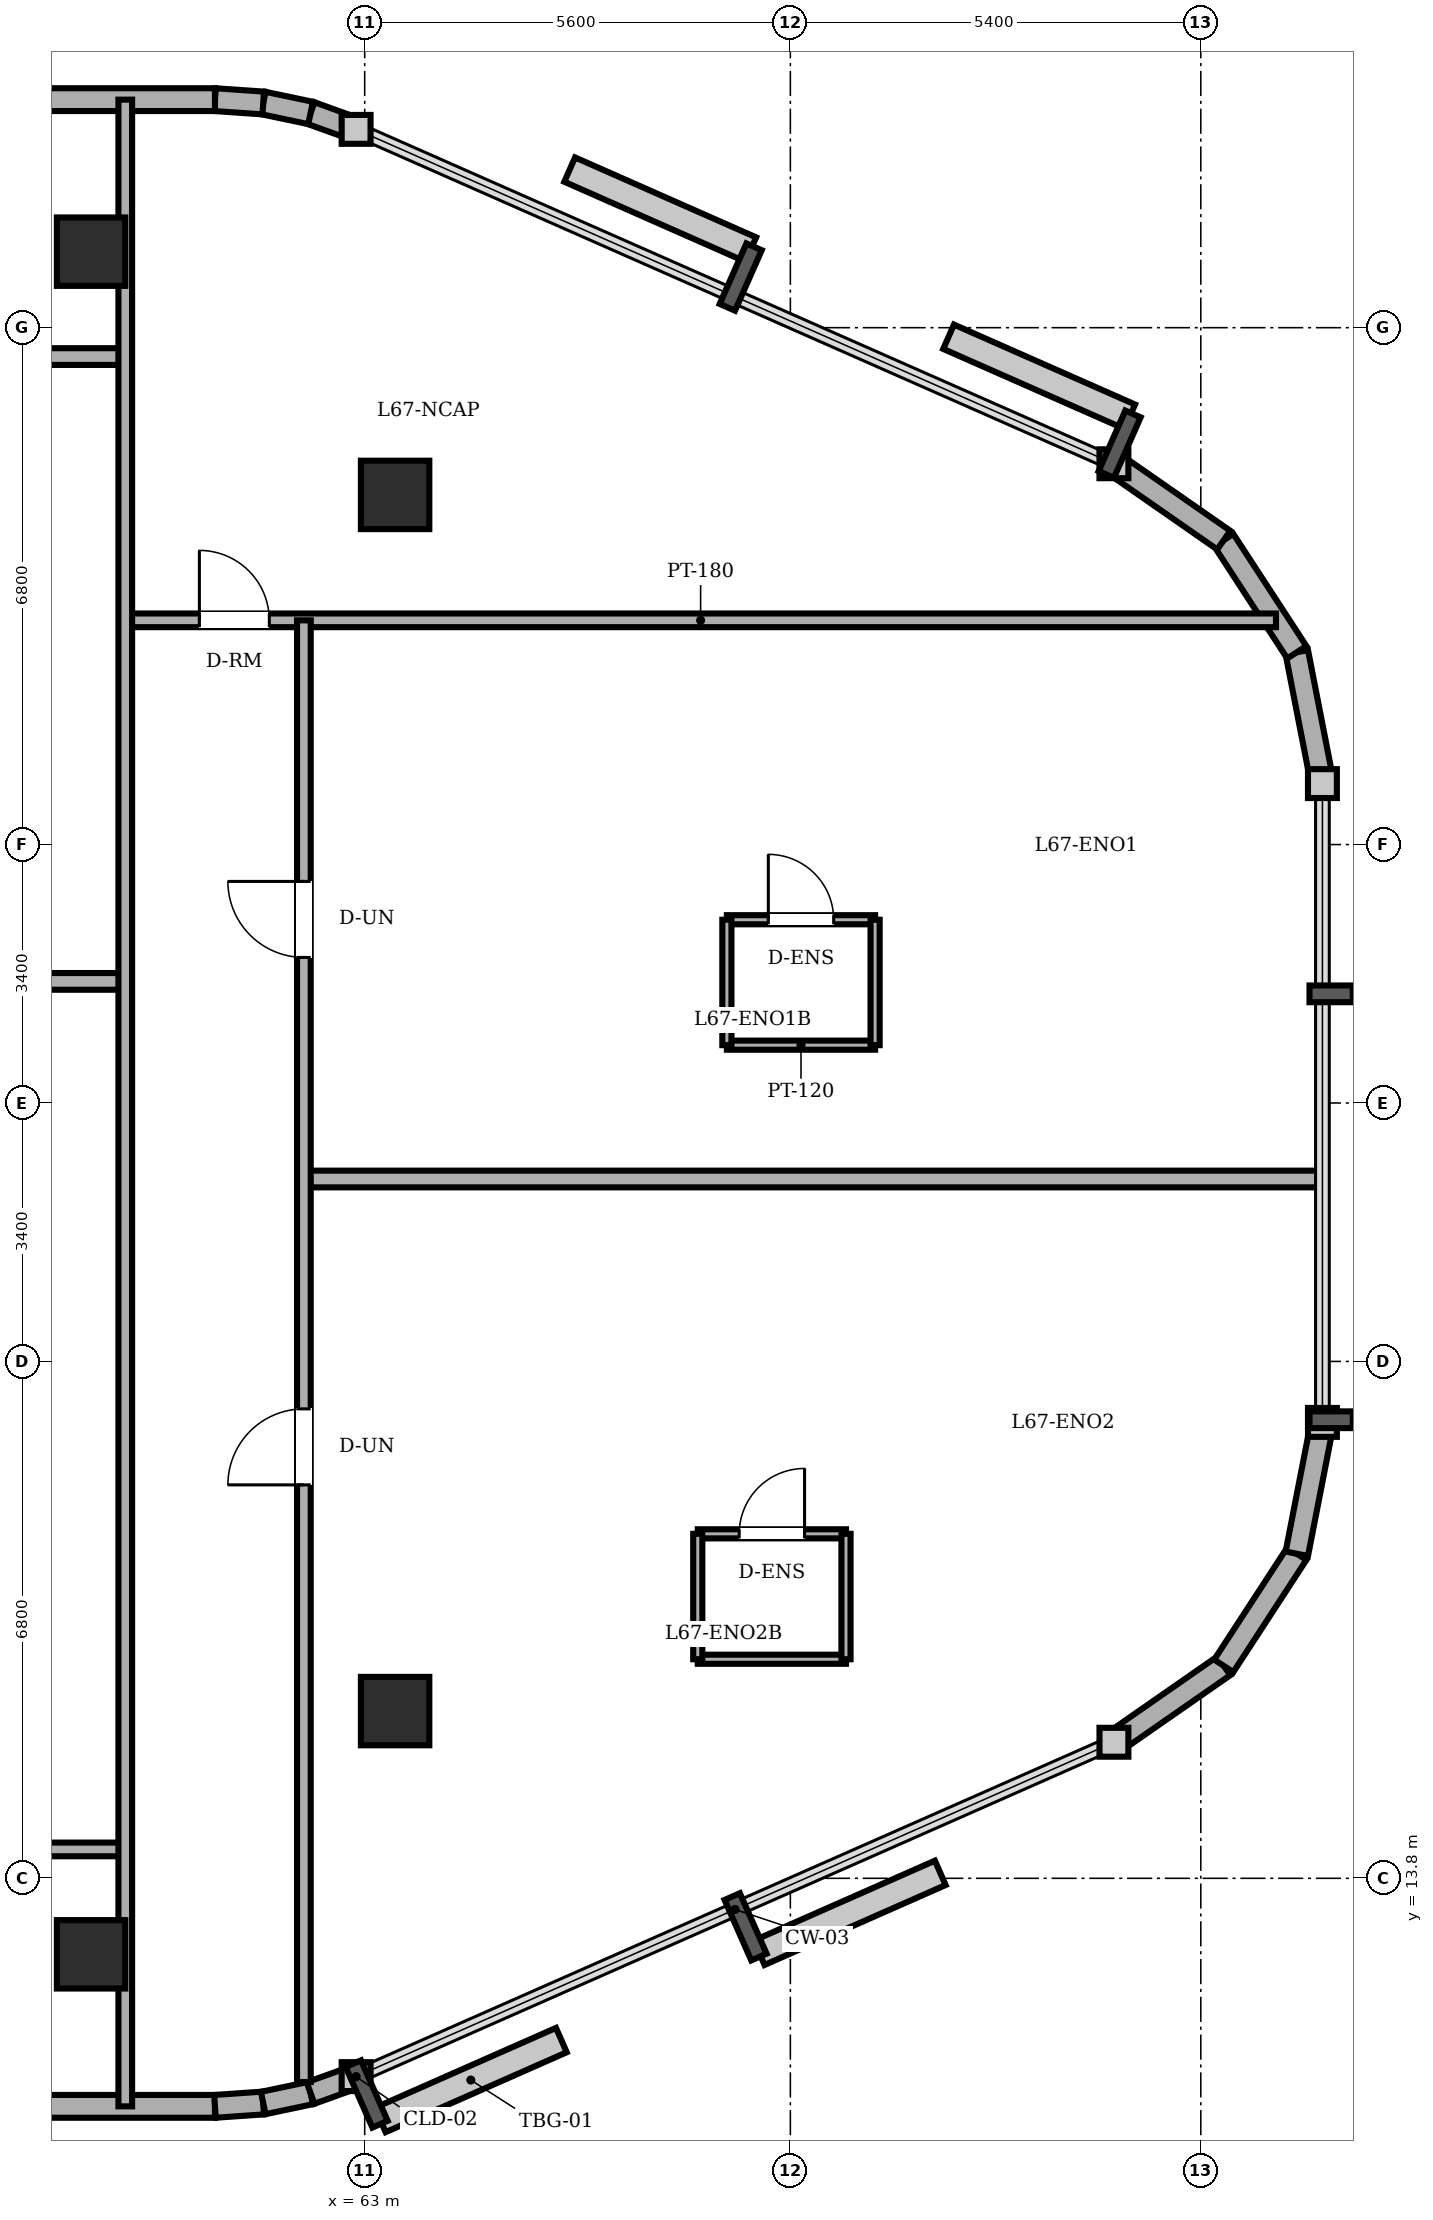
"""IFC4 building model, lengths in metres.
Left out: names, types, materials, properties, quantities, classifications, styles, units other than length and angle.
Written with IfcOpenShell. Run it as: python <this file> out.ifc"""

import sys

from ifc_helpers import new_model, si_unit, direction, frame, frame_2d, origin, origin_2d, place, context, subcontext, project, spatial, rectangle, circle, extrude, element, fill, save


model = new_model("IFC4")
c1 = context("Model", 3, precision=1e-05, world=origin(), true_north=direction((0.0, 1.0)))
c2 = subcontext(c1, "Body", "Model", "MODEL_VIEW")
j1 = project(units=[si_unit("LENGTHUNIT", "METRE"), si_unit("PLANEANGLEUNIT", "RADIAN")], contexts=[c1])
p1 = place(None, origin())
s1 = spatial("IfcSite", under=j1, at=p1, CompositionType="ELEMENT")
p2 = place(p1, origin())
s2 = spatial("IfcBuilding", under=s1, at=p2, CompositionType="ELEMENT")
p3 = place(p2, frame((0.0, 0.0, 258.8)))
s3 = spatial("IfcBuildingStorey", under=s2, at=p3, CompositionType="ELEMENT", Elevation=258.8)
for number, where, z_axis, x_axis in (
    (1, (59.4, 12.8, 0.0), (0.0, 0.0, 1.0), (1.0, 0.0, 0.0)),
    (2, (63.4, 16.0, 0.0), (0.0, 0.0, 1.0), (1.0, 0.0, 0.0)),
    (3, (63.4, 32.0, 0.0), (0.0, 0.0, 1.0), (1.0, 0.0, 0.0)),
    (4, (59.4, 35.2, 0.0), (0.0, 0.0, 1.0), (1.0, 0.0, 0.0)),
):
    element("IfcColumn", number, at=place(p3, frame(where, z_axis=z_axis, x_axis=x_axis)), inside=s3, PredefinedType="COLUMN", context=c2, shape_type="SweptSolid", body=[
        extrude(circle(Radius=0.45, at=origin_2d()), origin(), (0.0, 0.0, 1.0), 3.65),
    ])
p4 = place(p3, frame((24.0, 10.8, 0.0), z_axis=(0.0, 0.0, 1.0), x_axis=(1.0, 0.0, 0.0)))
e5 = element("IfcWall", 5, at=p4, inside=s3, PredefinedType="SOLIDWALL", context=c2, shape_type="SweptSolid", body=[
    extrude(rectangle(XDim=37.03, YDim=0.3, at=frame_2d((18.515, 0.0))), origin(), (0.0, 0.0, 1.0), 3.45),
])
p5 = place(p4, frame((9.725, 0.0, 0.0)))
e6 = element("IfcOpeningElement", 6, at=p5, cuts=e5, PredefinedType="OPENING", context=c2, shape_type="SweptSolid", body=[
    extrude(rectangle(XDim=0.95, YDim=2.2, at=frame_2d((0.475, 1.1))), frame((0.0, 0.16, 0.0), z_axis=(0.0, -1.0, 0.0), x_axis=(1.0, 0.0, 0.0)), (0.0, 0.0, 1.0), 0.32),
])
p6 = place(p4, frame((4.917, 0.0, 0.85)))
e7 = element("IfcOpeningElement", 7, at=p6, cuts=e5, PredefinedType="OPENING", context=c2, shape_type="SweptSolid", body=[
    extrude(rectangle(XDim=1.2, YDim=1.6, at=frame_2d((0.6, 0.8))), frame((0.0, 0.16, 0.0), z_axis=(0.0, -1.0, 0.0), x_axis=(1.0, 0.0, 0.0)), (0.0, 0.0, 1.0), 0.32),
])
p7 = place(p4, frame((21.917, 0.0, 0.85)))
e8 = element("IfcOpeningElement", 8, at=p7, cuts=e5, PredefinedType="OPENING", context=c2, shape_type="SweptSolid", body=[
    extrude(rectangle(XDim=1.2, YDim=1.6, at=frame_2d((0.6, 0.8))), frame((0.0, 0.16, 0.0), z_axis=(0.0, -1.0, 0.0), x_axis=(1.0, 0.0, 0.0)), (0.0, 0.0, 1.0), 0.32),
])
p8 = place(p4, frame((28.583, 0.0, 0.85)))
e9 = element("IfcOpeningElement", 9, at=p8, cuts=e5, PredefinedType="OPENING", context=c2, shape_type="SweptSolid", body=[
    extrude(rectangle(XDim=1.2, YDim=1.6, at=frame_2d((0.6, 0.8))), frame((0.0, 0.16, 0.0), z_axis=(0.0, -1.0, 0.0), x_axis=(1.0, 0.0, 0.0)), (0.0, 0.0, 1.0), 0.32),
])
p9 = place(p3, frame((61.03, 10.8, 0.0), z_axis=(0.0, 0.0, 1.0), x_axis=(0.997613959688, 0.069039028352, 0.0)))
e10 = element("IfcWall", 10, at=p9, inside=s3, PredefinedType="SOLIDWALL", context=c2, shape_type="SweptSolid", body=[
    extrude(rectangle(XDim=0.636, YDim=0.3, at=frame_2d((0.318, 0.0))), origin(), (0.0, 0.0, 1.0), 3.45),
])
p10 = place(p3, frame((61.665, 10.844, 0.0), z_axis=(0.0, 0.0, 1.0), x_axis=(0.97857012251, 0.205913854149, 0.0)))
e11 = element("IfcWall", 11, at=p10, inside=s3, PredefinedType="SOLIDWALL", context=c2, shape_type="SweptSolid", body=[
    extrude(rectangle(XDim=0.637, YDim=0.3, at=frame_2d((0.318, 0.0))), origin(), (0.0, 0.0, 1.0), 3.45),
])
p11 = place(p3, frame((62.288, 10.975, 0.0), z_axis=(0.0, 0.0, 1.0), x_axis=(0.94077491148, 0.339031806665, 0.0)))
e12 = element("IfcWall", 12, at=p11, inside=s3, PredefinedType="SOLIDWALL", context=c2, shape_type="SweptSolid", body=[
    extrude(rectangle(XDim=0.636, YDim=0.3, at=frame_2d((0.318, 0.0))), origin(), (0.0, 0.0, 1.0), 3.45),
])
p12 = place(p3, frame((72.857, 15.59, 0.0), z_axis=(0.0, 0.0, 1.0), x_axis=(0.821006966142, 0.570918174124, 0.0)))
e13 = element("IfcWall", 13, at=p12, inside=s3, PredefinedType="SOLIDWALL", context=c2, shape_type="SweptSolid", body=[
    extrude(rectangle(XDim=1.76, YDim=0.3, at=frame_2d((0.88, 0.0))), origin(), (0.0, 0.0, 1.0), 3.45),
])
for number, where, z_axis, x_axis in (
    (14, (74.302, 16.595, 0.0), (0.0, 0.0, 1.0), (0.546, 0.838, 0.0)),
    (15, (75.263, 18.07, 0.0), (0.0, 0.0, 1.0), (0.192, 0.981, 0.0)),
    (16, (75.6, 28.202, 0.0), (0.0, 0.0, 1.0), (-0.192, 0.981, 0.0)),
    (17, (75.263, 29.93, 0.0), (0.0, 0.0, 1.0), (-0.546, 0.838, 0.0)),
):
    element("IfcWall", number, at=place(p3, frame(where, z_axis=z_axis, x_axis=x_axis)), inside=s3, PredefinedType="SOLIDWALL", context=c2, shape_type="SweptSolid", body=[
        extrude(rectangle(XDim=1.76, YDim=0.3, at=frame_2d((0.88, 0.0))), origin(), (0.0, 0.0, 1.0), 3.45),
    ])
p13 = place(p3, frame((74.302, 31.405, 0.0), z_axis=(0.0, 0.0, 1.0), x_axis=(-0.821006966142, 0.570918174124, 0.0)))
e18 = element("IfcWall", 18, at=p13, inside=s3, PredefinedType="SOLIDWALL", context=c2, shape_type="SweptSolid", body=[
    extrude(rectangle(XDim=1.76, YDim=0.3, at=frame_2d((0.88, 0.0))), origin(), (0.0, 0.0, 1.0), 3.45),
])
p14 = place(p3, frame((62.887, 36.809, 0.0), z_axis=(0.0, 0.0, 1.0), x_axis=(-0.94077491148, 0.339031806665, 0.0)))
e19 = element("IfcWall", 19, at=p14, inside=s3, PredefinedType="SOLIDWALL", context=c2, shape_type="SweptSolid", body=[
    extrude(rectangle(XDim=0.636, YDim=0.3, at=frame_2d((0.318, 0.0))), origin(), (0.0, 0.0, 1.0), 3.45),
])
p15 = place(p3, frame((62.288, 37.025, 0.0), z_axis=(0.0, 0.0, 1.0), x_axis=(-0.97857012251, 0.205913854149, 0.0)))
e20 = element("IfcWall", 20, at=p15, inside=s3, PredefinedType="SOLIDWALL", context=c2, shape_type="SweptSolid", body=[
    extrude(rectangle(XDim=0.637, YDim=0.3, at=frame_2d((0.318, 0.0))), origin(), (0.0, 0.0, 1.0), 3.45),
])
p16 = place(p3, frame((61.665, 37.156, 0.0), z_axis=(0.0, 0.0, 1.0), x_axis=(-0.997613959688, 0.069039028352, 0.0)))
e21 = element("IfcWall", 21, at=p16, inside=s3, PredefinedType="SOLIDWALL", context=c2, shape_type="SweptSolid", body=[
    extrude(rectangle(XDim=0.636, YDim=0.3, at=frame_2d((0.318, 0.0))), origin(), (0.0, 0.0, 1.0), 3.45),
])
p17 = place(p3, frame((61.03, 37.2, 0.0), z_axis=(0.0, 0.0, 1.0), x_axis=(-1.0, 0.0, 0.0)))
e22 = element("IfcWall", 22, at=p17, inside=s3, PredefinedType="SOLIDWALL", context=c2, shape_type="SweptSolid", body=[
    extrude(rectangle(XDim=37.03, YDim=0.3, at=frame_2d((18.515, 0.0))), origin(), (0.0, 0.0, 1.0), 3.45),
])
p18 = place(p17, frame((30.855, 0.0, 0.0)))
e23 = element("IfcOpeningElement", 23, at=p18, cuts=e22, PredefinedType="OPENING", context=c2, shape_type="SweptSolid", body=[
    extrude(rectangle(XDim=0.95, YDim=2.2, at=frame_2d((0.475, 1.1))), frame((0.0, 0.16, 0.0), z_axis=(0.0, -1.0, 0.0), x_axis=(1.0, 0.0, 0.0)), (0.0, 0.0, 1.0), 0.32),
])
p19 = place(p17, frame((7.247, 0.0, 0.85)))
e24 = element("IfcOpeningElement", 24, at=p19, cuts=e22, PredefinedType="OPENING", context=c2, shape_type="SweptSolid", body=[
    extrude(rectangle(XDim=1.2, YDim=1.6, at=frame_2d((0.6, 0.8))), frame((0.0, 0.16, 0.0), z_axis=(0.0, -1.0, 0.0), x_axis=(1.0, 0.0, 0.0)), (0.0, 0.0, 1.0), 0.32),
])
p20 = place(p17, frame((13.913, 0.0, 0.85)))
e25 = element("IfcOpeningElement", 25, at=p20, cuts=e22, PredefinedType="OPENING", context=c2, shape_type="SweptSolid", body=[
    extrude(rectangle(XDim=1.2, YDim=1.6, at=frame_2d((0.6, 0.8))), frame((0.0, 0.16, 0.0), z_axis=(0.0, -1.0, 0.0), x_axis=(1.0, 0.0, 0.0)), (0.0, 0.0, 1.0), 0.32),
])
p21 = place(p17, frame((25.747, 0.0, 0.85)))
e26 = element("IfcOpeningElement", 26, at=p21, cuts=e22, PredefinedType="OPENING", context=c2, shape_type="SweptSolid", body=[
    extrude(rectangle(XDim=1.2, YDim=1.6, at=frame_2d((0.6, 0.8))), frame((0.0, 0.16, 0.0), z_axis=(0.0, -1.0, 0.0), x_axis=(1.0, 0.0, 0.0)), (0.0, 0.0, 1.0), 0.32),
])
p22 = place(p3, frame((67.765, 26.411, 0.0), z_axis=(0.0, 0.0, 1.0), x_axis=(1.0, 0.0, 0.0)))
e27 = element("IfcWall", 27, at=p22, inside=s3, PredefinedType="PARTITIONING", context=c2, shape_type="SweptSolid", body=[
    extrude(rectangle(XDim=1.95, YDim=0.12, at=frame_2d((0.975, 0.0))), origin(), (0.0, 0.0, 1.0), 3.45),
])
p23 = place(p22, frame((0.545, 0.0, 0.0)))
e28 = element("IfcOpeningElement", 28, at=p23, cuts=e27, PredefinedType="OPENING", context=c2, shape_type="SweptSolid", body=[
    extrude(rectangle(XDim=0.86, YDim=2.1, at=frame_2d((0.43, 1.05))), frame((0.0, 0.07, 0.0), z_axis=(0.0, -1.0, 0.0), x_axis=(1.0, 0.0, 0.0)), (0.0, 0.0, 1.0), 0.14),
])
p24 = place(p3, frame((69.715, 24.761, 0.0), z_axis=(0.0, 0.0, 1.0), x_axis=(-1.0, 0.0, 0.0)))
e29 = element("IfcWall", 29, at=p24, inside=s3, PredefinedType="PARTITIONING", context=c2, shape_type="SweptSolid", body=[
    extrude(rectangle(XDim=1.95, YDim=0.12, at=frame_2d((0.975, 0.0))), origin(), (0.0, 0.0, 1.0), 3.45),
])
for number, where, z_axis, x_axis in (
    (30, (67.765, 26.411, 0.0), (0.0, 0.0, 1.0), (0.0, -1.0, 0.0)),
    (31, (69.715, 24.761, 0.0), (0.0, 0.0, 1.0), (0.0, 1.0, 0.0)),
):
    element("IfcWall", number, at=place(p3, frame(where, z_axis=z_axis, x_axis=x_axis)), inside=s3, PredefinedType="PARTITIONING", context=c2, shape_type="SweptSolid", body=[
        extrude(rectangle(XDim=1.65, YDim=0.12, at=frame_2d((0.825, 0.0))), origin(), (0.0, 0.0, 1.0), 3.45),
    ])
p25 = place(p3, frame((67.382, 18.332, 0.0), z_axis=(0.0, 0.0, 1.0), x_axis=(1.0, 0.0, 0.0)))
e32 = element("IfcWall", 32, at=p25, inside=s3, PredefinedType="PARTITIONING", context=c2, shape_type="SweptSolid", body=[
    extrude(rectangle(XDim=1.95, YDim=0.12, at=frame_2d((0.975, 0.0))), origin(), (0.0, 0.0, 1.0), 3.45),
])
p26 = place(p25, frame((0.545, 0.0, 0.0)))
e33 = element("IfcOpeningElement", 33, at=p26, cuts=e32, PredefinedType="OPENING", context=c2, shape_type="SweptSolid", body=[
    extrude(rectangle(XDim=0.86, YDim=2.1, at=frame_2d((0.43, 1.05))), frame((0.0, 0.07, 0.0), z_axis=(0.0, -1.0, 0.0), x_axis=(1.0, 0.0, 0.0)), (0.0, 0.0, 1.0), 0.14),
])
p27 = place(p3, frame((69.332, 16.682, 0.0), z_axis=(0.0, 0.0, 1.0), x_axis=(-1.0, 0.0, 0.0)))
e34 = element("IfcWall", 34, at=p27, inside=s3, PredefinedType="PARTITIONING", context=c2, shape_type="SweptSolid", body=[
    extrude(rectangle(XDim=1.95, YDim=0.12, at=frame_2d((0.975, 0.0))), origin(), (0.0, 0.0, 1.0), 3.45),
])
for number, where, z_axis, x_axis in (
    (35, (67.382, 18.332, 0.0), (0.0, 0.0, 1.0), (0.0, -1.0, 0.0)),
    (36, (69.332, 16.682, 0.0), (0.0, 0.0, 1.0), (0.0, 1.0, 0.0)),
):
    element("IfcWall", number, at=place(p3, frame(where, z_axis=z_axis, x_axis=x_axis)), inside=s3, PredefinedType="PARTITIONING", context=c2, shape_type="SweptSolid", body=[
        extrude(rectangle(XDim=1.65, YDim=0.12, at=frame_2d((0.825, 0.0))), origin(), (0.0, 0.0, 1.0), 3.45),
    ])
p28 = place(p3, frame((39.85, 14.18, 0.0), z_axis=(0.0, 0.0, 1.0), x_axis=(1.0, 0.0, 0.0)))
e37 = element("IfcWall", 37, at=p28, inside=s3, PredefinedType="PARTITIONING", context=c2, shape_type="SweptSolid", body=[
    extrude(rectangle(XDim=20.0, YDim=0.18, at=frame_2d((10.0, 0.0))), origin(), (0.0, 0.0, 1.0), 3.092),
])
p29 = place(p28, frame((9.54, 0.0, 0.0)))
e38 = element("IfcOpeningElement", 38, at=p29, cuts=e37, PredefinedType="OPENING", context=c2, shape_type="SweptSolid", body=[
    extrude(rectangle(XDim=0.92, YDim=2.1, at=frame_2d((0.46, 1.05))), frame((0.0, 0.1, 0.0), z_axis=(0.0, -1.0, 0.0), x_axis=(1.0, 0.0, 0.0)), (0.0, 0.0, 1.0), 0.2),
])
p30 = place(p3, frame((62.2, 23.0, 0.0), z_axis=(0.0, 0.0, 1.0), x_axis=(1.0, 0.0, 0.0)))
e39 = element("IfcWall", 39, at=p30, inside=s3, PredefinedType="PARTITIONING", context=c2, shape_type="SweptSolid", body=[
    extrude(rectangle(XDim=13.4, YDim=0.22, at=frame_2d((6.7, 0.0))), origin(), (0.0, 0.0, 1.0), 3.45),
])
p31 = place(p3, frame((39.85, 25.6, 0.0), z_axis=(0.0, 0.0, 1.0), x_axis=(1.0, 0.0, 0.0)))
e40 = element("IfcWall", 40, at=p31, inside=s3, PredefinedType="PARTITIONING", context=c2, shape_type="SweptSolid", body=[
    extrude(rectangle(XDim=20.0, YDim=0.22, at=frame_2d((10.0, 0.0))), origin(), (0.0, 0.0, 1.0), 3.45),
])
p32 = place(p3, frame((59.85, 30.35, 0.0), z_axis=(0.0, 0.0, 1.0), x_axis=(1.0, 0.0, 0.0)))
e41 = element("IfcWall", 41, at=p32, inside=s3, PredefinedType="PARTITIONING", context=c2, shape_type="SweptSolid", body=[
    extrude(rectangle(XDim=15.139, YDim=0.18, at=frame_2d((7.569, 0.0))), origin(), (0.0, 0.0, 1.0), 3.45),
])
p33 = place(p32, frame((0.975, 0.0, 0.0)))
e42 = element("IfcOpeningElement", 42, at=p33, cuts=e41, PredefinedType="OPENING", context=c2, shape_type="SweptSolid", body=[
    extrude(rectangle(XDim=0.92, YDim=2.1, at=frame_2d((0.46, 1.05))), frame((0.0, 0.1, 0.0), z_axis=(0.0, -1.0, 0.0), x_axis=(1.0, 0.0, 0.0)), (0.0, 0.0, 1.0), 0.2),
])
p34 = place(p3, frame((39.85, 33.82, 0.0), z_axis=(0.0, 0.0, 1.0), x_axis=(1.0, 0.0, 0.0)))
e43 = element("IfcWall", 43, at=p34, inside=s3, PredefinedType="PARTITIONING", context=c2, shape_type="SweptSolid", body=[
    extrude(rectangle(XDim=20.0, YDim=0.22, at=frame_2d((10.0, 0.0))), origin(), (0.0, 0.0, 1.0), 3.092),
])
p35 = place(p3, frame((59.85, 10.8, 0.0), z_axis=(0.0, 0.0, 1.0), x_axis=(0.0, 1.0, 0.0)))
e44 = element("IfcWall", 44, at=p35, inside=s3, PredefinedType="PARTITIONING", context=c2, shape_type="SweptSolid", body=[
    extrude(rectangle(XDim=26.4, YDim=0.18, at=frame_2d((13.2, 0.0))), origin(), (0.0, 0.0, 1.0), 3.45),
])
p36 = place(p3, frame((62.2, 11.12, 0.0), z_axis=(0.0, 0.0, 1.0), x_axis=(0.0, 1.0, 0.0)))
e45 = element("IfcWall", 45, at=p36, inside=s3, PredefinedType="PARTITIONING", context=c2, shape_type="SweptSolid", body=[
    extrude(rectangle(XDim=19.23, YDim=0.18, at=frame_2d((9.615, 0.0))), origin(), (0.0, 0.0, 1.0), 3.45),
])
p37 = place(p36, frame((14.795, 0.0, 0.0)))
e46 = element("IfcOpeningElement", 46, at=p37, cuts=e45, PredefinedType="OPENING", context=c2, shape_type="SweptSolid", body=[
    extrude(rectangle(XDim=1.0, YDim=2.15, at=frame_2d((0.5, 1.075))), frame((0.0, 0.1, 0.0), z_axis=(0.0, -1.0, 0.0), x_axis=(1.0, 0.0, 0.0)), (0.0, 0.0, 1.0), 0.2),
])
p38 = place(p36, frame((7.856, 0.0, 0.0)))
e47 = element("IfcOpeningElement", 47, at=p38, cuts=e45, PredefinedType="OPENING", context=c2, shape_type="SweptSolid", body=[
    extrude(rectangle(XDim=1.0, YDim=2.15, at=frame_2d((0.5, 1.075))), frame((0.0, 0.1, 0.0), z_axis=(0.0, -1.0, 0.0), x_axis=(1.0, 0.0, 0.0)), (0.0, 0.0, 1.0), 0.2),
])
p39 = place(p23, origin())
e48 = element("IfcDoor", 48, at=p39, inside=s3, OperationType="SINGLE_SWING_LEFT", PredefinedType="DOOR", context=c2, shape_type="SweptSolid", body=[
    extrude(rectangle(XDim=0.86, YDim=2.1, at=frame_2d((0.43, 1.05))), frame((0.0, 0.025, 0.0), z_axis=(0.0, -1.0, 0.0), x_axis=(1.0, 0.0, 0.0)), (0.0, 0.0, 1.0), 0.05),
])
fill(e28, e48)
p40 = place(p26, origin())
e49 = element("IfcDoor", 49, at=p40, inside=s3, OperationType="SINGLE_SWING_RIGHT", PredefinedType="DOOR", context=c2, shape_type="SweptSolid", body=[
    extrude(rectangle(XDim=0.86, YDim=2.1, at=frame_2d((0.43, 1.05))), frame((0.0, 0.025, 0.0), z_axis=(0.0, -1.0, 0.0), x_axis=(1.0, 0.0, 0.0)), (0.0, 0.0, 1.0), 0.05),
])
fill(e33, e49)
p41 = place(p33, origin())
e50 = element("IfcDoor", 50, at=p41, inside=s3, OperationType="SINGLE_SWING_LEFT", PredefinedType="DOOR", context=c2, shape_type="SweptSolid", body=[
    extrude(rectangle(XDim=0.92, YDim=2.1, at=frame_2d((0.46, 1.05))), frame((0.0, 0.025, 0.0), z_axis=(0.0, -1.0, 0.0), x_axis=(1.0, 0.0, 0.0)), (0.0, 0.0, 1.0), 0.05),
])
fill(e42, e50)
p42 = place(p37, origin())
e51 = element("IfcDoor", 51, at=p42, inside=s3, OperationType="SINGLE_SWING_RIGHT", PredefinedType="DOOR", context=c2, shape_type="SweptSolid", body=[
    extrude(rectangle(XDim=1.0, YDim=2.15, at=frame_2d((0.5, 1.075))), frame((0.0, 0.025, 0.0), z_axis=(0.0, -1.0, 0.0), x_axis=(1.0, 0.0, 0.0)), (0.0, 0.0, 1.0), 0.05),
])
fill(e46, e51)
p43 = place(p38, origin())
e52 = element("IfcDoor", 52, at=p43, inside=s3, OperationType="SINGLE_SWING_LEFT", PredefinedType="DOOR", context=c2, shape_type="SweptSolid", body=[
    extrude(rectangle(XDim=1.0, YDim=2.15, at=frame_2d((0.5, 1.075))), frame((0.0, 0.025, 0.0), z_axis=(0.0, -1.0, 0.0), x_axis=(1.0, 0.0, 0.0)), (0.0, 0.0, 1.0), 0.05),
])
fill(e47, e52)
save(model, sys.argv[1])
